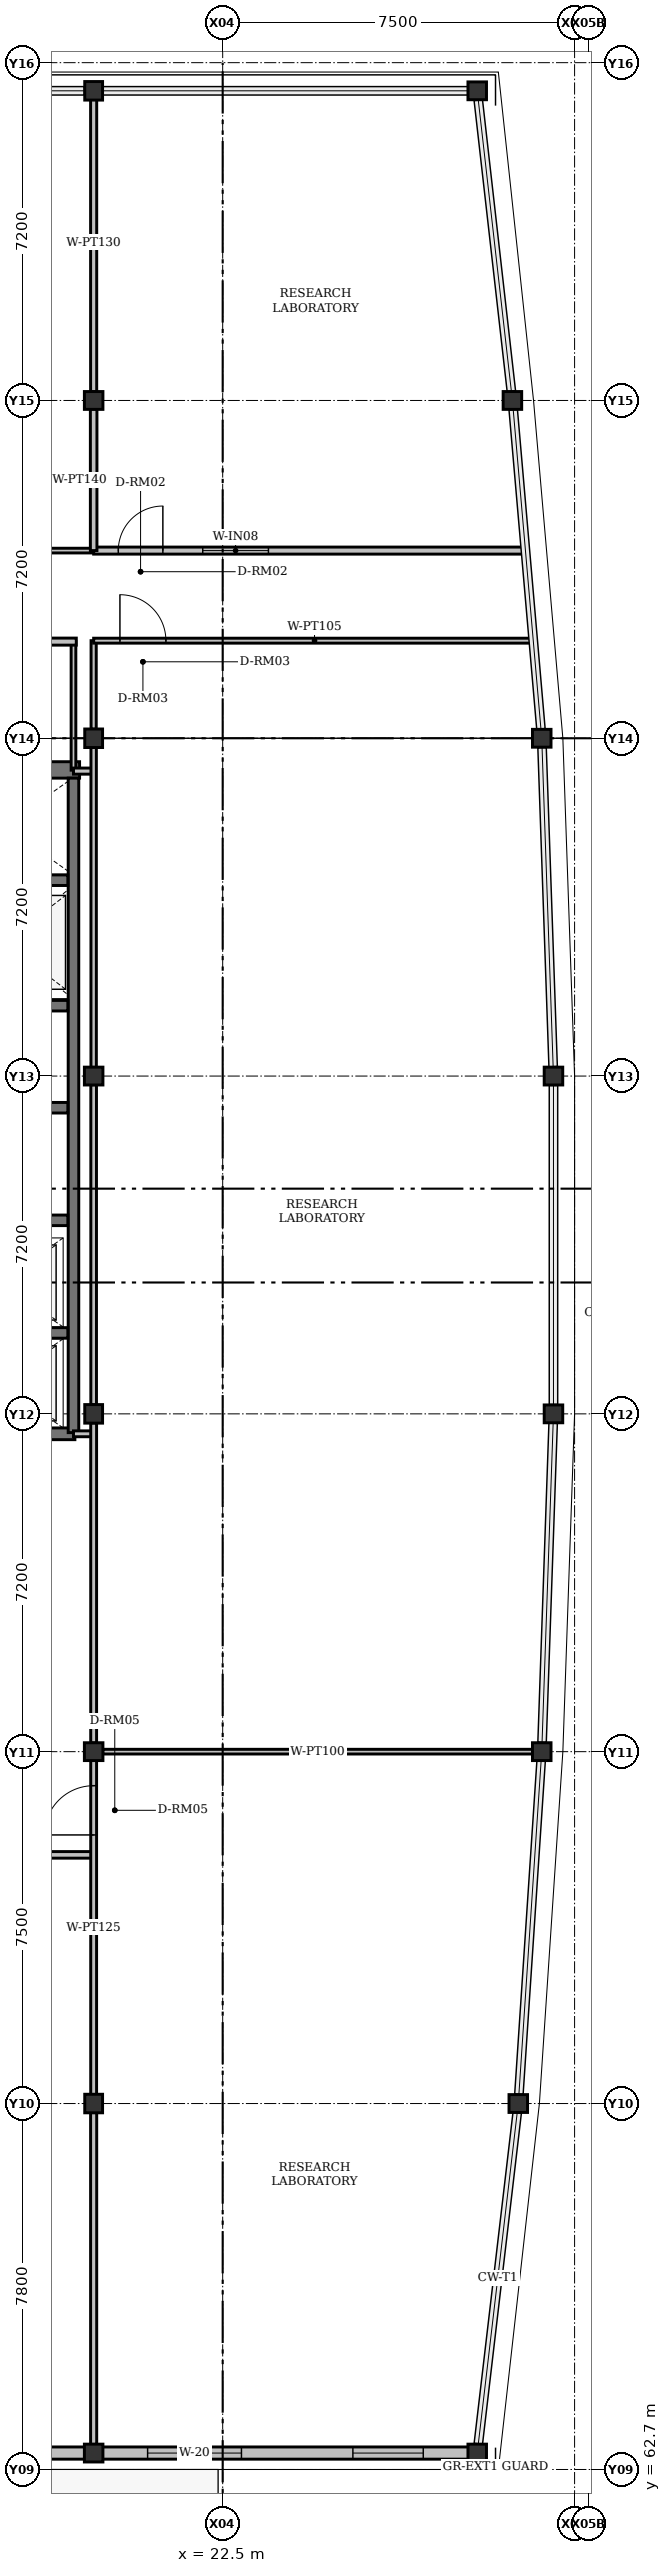
"""IFC4 building model, lengths in metres.
Left out: names, types, materials, properties, quantities, classifications, styles, units other than length and angle.
Written with IfcOpenShell. Run it as: python <this file> out.ifc"""

import sys

from ifc_helpers import new_model, si_unit, direction, frame, frame_2d, origin, origin_2d, place, context, subcontext, project, spatial, rectangle, i_section, extrude, element, fill, save


model = new_model("IFC4")
c1 = context("Model", 3, precision=1e-05, world=origin(), true_north=direction((0.0, 1.0)))
c2 = subcontext(c1, "Body", "Model", "MODEL_VIEW")
j1 = project(units=[si_unit("LENGTHUNIT", "METRE"), si_unit("PLANEANGLEUNIT", "RADIAN")], contexts=[c1])
p1 = place(None, origin())
s1 = spatial("IfcSite", under=j1, at=p1, CompositionType="ELEMENT")
p2 = place(p1, origin())
s2 = spatial("IfcBuilding", under=s1, at=p2, CompositionType="ELEMENT")
p3 = place(p2, frame((0.0, 0.0, 14.1)))
s3 = spatial("IfcBuildingStorey", under=s2, at=p3, CompositionType="ELEMENT", Elevation=14.1)
for number, where, z_axis, x_axis in (
    (1, (19.75, 63.05, 0.0), (0.0, 0.0, 1.0), (1.0, 0.0, 0.0)),
    (2, (27.925, 63.05, 0.0), (0.0, 0.0, 1.0), (1.0, 0.0, 0.0)),
    (3, (19.75, 70.5, 0.0), (0.0, 0.0, 1.0), (0.0, 1.0, 0.0)),
    (4, (28.8, 70.5, 0.0), (0.0, 0.0, 1.0), (1.0, 0.0, 0.0)),
    (5, (19.75, 78.0, 0.0), (0.0, 0.0, 1.0), (1.0, 0.0, 0.0)),
    (6, (29.3, 78.0, 0.0), (0.0, 0.0, 1.0), (1.0, 0.0, 0.0)),
    (7, (19.75, 85.2, 0.0), (0.0, 0.0, 1.0), (0.0, 1.0, 0.0)),
    (8, (29.55, 85.2, 0.0), (0.0, 0.0, 1.0), (1.0, 0.0, 0.0)),
    (9, (19.75, 92.4, 0.0), (0.0, 0.0, 1.0), (1.0, 0.0, 0.0)),
    (10, (29.55, 92.4, 0.0), (0.0, 0.0, 1.0), (1.0, 0.0, 0.0)),
    (11, (19.75, 99.6, 0.0), (0.0, 0.0, 1.0), (0.0, 1.0, 0.0)),
    (12, (29.3, 99.6, 0.0), (0.0, 0.0, 1.0), (1.0, 0.0, 0.0)),
    (13, (19.75, 106.8, 0.0), (0.0, 0.0, 1.0), (1.0, 0.0, 0.0)),
    (14, (28.675, 106.8, 0.0), (0.0, 0.0, 1.0), (1.0, 0.0, 0.0)),
    (15, (19.75, 113.4, 0.0), (0.0, 0.0, 1.0), (0.0, 1.0, 0.0)),
    (16, (27.925, 113.4, 0.0), (0.0, 0.0, 1.0), (1.0, 0.0, 0.0)),
):
    element("IfcColumn", number, at=place(p3, frame(where, z_axis=z_axis, x_axis=x_axis)), inside=s3, PredefinedType="COLUMN", context=c2, shape_type="SweptSolid", body=[
        extrude(i_section(OverallWidth=0.395, OverallDepth=0.38, WebThickness=0.019, FlangeThickness=0.03, FilletRadius=0.015, at=origin_2d()), origin(), (0.0, 0.0, 1.0), 4.2),
    ])
p4 = place(p3, frame((19.75, 63.05, 0.0), z_axis=(0.0, 0.0, 1.0), x_axis=(-1.0, 0.0, 0.0)))
e17 = element("IfcWall", 17, at=p4, inside=s3, PredefinedType="SOLIDWALL", context=c2, shape_type="SweptSolid", body=[
    extrude(rectangle(XDim=11.9, YDim=0.26, at=frame_2d((5.95, 0.0))), origin(), (0.0, 0.0, 1.0), 3.577),
])
p5 = place(p4, frame((1.15, 0.0, 0.92)))
e18 = element("IfcOpeningElement", 18, at=p5, cuts=e17, PredefinedType="OPENING", context=c2, shape_type="SweptSolid", body=[
    extrude(rectangle(XDim=1.8, YDim=1.55, at=frame_2d((0.9, 0.775))), frame((0.0, 0.13, 0.0), z_axis=(0.0, -1.0, 0.0), x_axis=(1.0, 0.0, 0.0)), (0.0, 0.0, 1.0), 0.26),
])
p6 = place(p4, frame((8.35, 0.0, 0.92)))
e19 = element("IfcOpeningElement", 19, at=p6, cuts=e17, PredefinedType="OPENING", context=c2, shape_type="SweptSolid", body=[
    extrude(rectangle(XDim=2.4, YDim=1.7, at=frame_2d((1.2, 0.85))), frame((0.0, 0.13, 0.0), z_axis=(0.0, -1.0, 0.0), x_axis=(1.0, 0.0, 0.0)), (0.0, 0.0, 1.0), 0.26),
])
p7 = place(p3, frame((27.925, 63.05, 0.0), z_axis=(0.0, 0.0, 1.0), x_axis=(-1.0, 0.0, 0.0)))
e20 = element("IfcWall", 20, at=p7, inside=s3, PredefinedType="SOLIDWALL", context=c2, shape_type="SweptSolid", body=[
    extrude(rectangle(XDim=8.175, YDim=0.26, at=frame_2d((4.087, 0.0))), origin(), (0.0, 0.0, 1.0), 3.577),
])
p8 = place(p7, frame((1.15, 0.0, 0.92)))
e21 = element("IfcOpeningElement", 21, at=p8, cuts=e20, PredefinedType="OPENING", context=c2, shape_type="SweptSolid", body=[
    extrude(rectangle(XDim=1.5, YDim=1.7, at=frame_2d((0.75, 0.85))), frame((0.0, 0.13, 0.0), z_axis=(0.0, -1.0, 0.0), x_axis=(1.0, 0.0, 0.0)), (0.0, 0.0, 1.0), 0.26),
])
p9 = place(p7, frame((5.025, 0.0, 0.92)))
e22 = element("IfcOpeningElement", 22, at=p9, cuts=e20, PredefinedType="OPENING", context=c2, shape_type="SweptSolid", body=[
    extrude(rectangle(XDim=2.0, YDim=1.35, at=frame_2d((1.0, 0.675))), frame((0.0, 0.13, 0.0), z_axis=(0.0, -1.0, 0.0), x_axis=(1.0, 0.0, 0.0)), (0.0, 0.0, 1.0), 0.26),
])
p10 = place(p3, frame((16.15, 98.925, 0.0), z_axis=(0.0, 0.0, 1.0), x_axis=(1.0, 0.0, 0.0)))
e23 = element("IfcWall", 23, at=p10, inside=s3, PredefinedType="SHEAR", context=c2, shape_type="SweptSolid", body=[
    extrude(rectangle(XDim=3.3, YDim=0.35, at=frame_2d((1.65, 0.0))), origin(), (0.0, 0.0, 1.0), 4.2),
])
p11 = place(p3, frame((16.4, 84.775, 0.0), z_axis=(0.0, 0.0, 1.0), x_axis=(1.0, 0.0, 0.0)))
e24 = element("IfcWall", 24, at=p11, inside=s3, PredefinedType="SHEAR", context=c2, shape_type="SweptSolid", body=[
    extrude(rectangle(XDim=2.95, YDim=0.25, at=frame_2d((1.475, 0.0))), origin(), (0.0, 0.0, 1.0), 4.2),
])
p12 = place(p3, frame((19.32, 84.8, 0.0), z_axis=(0.0, 0.0, 1.0), x_axis=(0.0, 1.0, 0.0)))
e25 = element("IfcWall", 25, at=p12, inside=s3, PredefinedType="SHEAR", context=c2, shape_type="SweptSolid", body=[
    extrude(rectangle(XDim=13.95, YDim=0.225, at=frame_2d((6.975, 0.0))), origin(), (0.0, 0.0, 1.0), 4.2),
])
for number, where, z_axis, x_axis in (
    (26, (16.4, 86.925, 0.0), (0.0, 0.0, 1.0), (1.0, 0.0, 0.0)),
    (27, (16.4, 89.325, 0.0), (0.0, 0.0, 1.0), (1.0, 0.0, 0.0)),
    (28, (16.4, 91.725, 0.0), (0.0, 0.0, 1.0), (1.0, 0.0, 0.0)),
    (29, (16.4, 93.9, 0.0), (0.0, 0.0, 1.0), (1.0, 0.0, 0.0)),
    (30, (16.4, 96.575, 0.0), (0.0, 0.0, 1.0), (1.0, 0.0, 0.0)),
):
    element("IfcWall", number, at=place(p3, frame(where, z_axis=z_axis, x_axis=x_axis)), inside=s3, PredefinedType="SHEAR", context=c2, shape_type="SweptSolid", body=[
        extrude(rectangle(XDim=2.8, YDim=0.225, at=frame_2d((1.4, 0.0))), origin(), (0.0, 0.0, 1.0), 4.2),
    ])
p13 = place(p3, frame((19.32, 98.92, 0.0), z_axis=(0.0, 0.0, 1.0), x_axis=(0.0, 1.0, 0.0)))
e31 = element("IfcWall", 31, at=p13, inside=s3, PredefinedType="PARTITIONING", context=c2, shape_type="SweptSolid", body=[
    extrude(rectangle(XDim=2.74, YDim=0.1, at=frame_2d((1.37, 0.0))), origin(), (0.0, 0.0, 1.0), 3.451),
])
p14 = place(p3, frame((19.38, 101.66, 0.0), z_axis=(0.0, 0.0, 1.0), x_axis=(-1.0, 0.0, 0.0)))
e32 = element("IfcWall", 32, at=p14, inside=s3, PredefinedType="PARTITIONING", context=c2, shape_type="SweptSolid", body=[
    extrude(rectangle(XDim=3.16, YDim=0.15, at=frame_2d((1.58, 0.0))), origin(), (0.0, 0.0, 1.0), 3.95),
])
p15 = place(p3, frame((19.75, 98.9, 0.0), z_axis=(0.0, 0.0, 1.0), x_axis=(-1.0, 0.0, 0.0)))
e33 = element("IfcWall", 33, at=p15, inside=s3, PredefinedType="PARTITIONING", context=c2, shape_type="SweptSolid", body=[
    extrude(rectangle(XDim=0.43, YDim=0.13, at=frame_2d((0.215, 0.0))), origin(), (0.0, 0.0, 1.0), 3.527),
])
p16 = place(p3, frame((19.32, 84.775, 0.0), z_axis=(0.0, 0.0, 1.0), x_axis=(1.0, 0.0, 0.0)))
e34 = element("IfcWall", 34, at=p16, inside=s3, PredefinedType="PARTITIONING", context=c2, shape_type="SweptSolid", body=[
    extrude(rectangle(XDim=0.43, YDim=0.125, at=frame_2d((0.215, 0.0))), origin(), (0.0, 0.0, 1.0), 3.527),
])
p17 = place(p3, frame((0.65, 103.6, 0.0), z_axis=(0.0, 0.0, 1.0), x_axis=(1.0, 0.0, 0.0)))
e35 = element("IfcWall", 35, at=p17, inside=s3, PredefinedType="PARTITIONING", context=c2, shape_type="SweptSolid", body=[
    extrude(rectangle(XDim=19.1, YDim=0.1, at=frame_2d((9.55, 0.0))), origin(), (0.0, 0.0, 1.0), 3.527),
])
p18 = place(p17, frame((9.49, 0.0, 0.0)))
e36 = element("IfcOpeningElement", 36, at=p18, cuts=e35, PredefinedType="OPENING", context=c2, shape_type="SweptSolid", body=[
    extrude(rectangle(XDim=0.92, YDim=2.1, at=frame_2d((0.46, 1.05))), frame((0.0, 0.05, 0.0), z_axis=(0.0, -1.0, 0.0), x_axis=(1.0, 0.0, 0.0)), (0.0, 0.0, 1.0), 0.1),
])
p19 = place(p17, frame((11.26, 0.0, 0.92)))
e37 = element("IfcOpeningElement", 37, at=p19, cuts=e35, PredefinedType="OPENING", context=c2, shape_type="SweptSolid", body=[
    extrude(rectangle(XDim=1.2, YDim=1.2, at=frame_2d((0.6, 0.6))), frame((0.0, 0.05, 0.0), z_axis=(0.0, -1.0, 0.0), x_axis=(1.0, 0.0, 0.0)), (0.0, 0.0, 1.0), 0.1),
])
p20 = place(p3, frame((19.75, 103.6, 0.0), z_axis=(0.0, 0.0, 1.0), x_axis=(1.0, 0.0, 0.0)))
e38 = element("IfcWall", 38, at=p20, inside=s3, PredefinedType="PARTITIONING", context=c2, shape_type="SweptSolid", body=[
    extrude(rectangle(XDim=9.165, YDim=0.15, at=frame_2d((4.583, 0.0))), origin(), (0.0, 0.0, 1.0), 3.527),
])
p21 = place(p20, frame((0.525, 0.0, 0.0)))
e39 = element("IfcOpeningElement", 39, at=p21, cuts=e38, PredefinedType="OPENING", context=c2, shape_type="SweptSolid", body=[
    extrude(rectangle(XDim=0.95, YDim=2.1, at=frame_2d((0.475, 1.05))), frame((0.0, 0.075, 0.0), z_axis=(0.0, -1.0, 0.0), x_axis=(1.0, 0.0, 0.0)), (0.0, 0.0, 1.0), 0.15),
])
p22 = place(p20, frame((2.325, 0.0, 0.92)))
e40 = element("IfcOpeningElement", 40, at=p22, cuts=e38, PredefinedType="OPENING", context=c2, shape_type="SweptSolid", body=[
    extrude(rectangle(XDim=1.4, YDim=1.2, at=frame_2d((0.7, 0.6))), frame((0.0, 0.075, 0.0), z_axis=(0.0, -1.0, 0.0), x_axis=(1.0, 0.0, 0.0)), (0.0, 0.0, 1.0), 0.15),
])
p23 = place(p3, frame((19.75, 106.615, 0.0), z_axis=(0.0, 0.0, 1.0), x_axis=(0.0, -1.0, 0.0)))
e41 = element("IfcWall", 41, at=p23, inside=s3, PredefinedType="PARTITIONING", context=c2, shape_type="SweptSolid", body=[
    extrude(rectangle(XDim=3.015, YDim=0.14, at=frame_2d((1.507, 0.0))), origin(), (0.0, 0.0, 1.0), 3.527),
])
p24 = place(p3, frame((19.75, 113.35, 0.0), z_axis=(0.0, 0.0, 1.0), x_axis=(0.0, -1.0, 0.0)))
e42 = element("IfcWall", 42, at=p24, inside=s3, PredefinedType="PARTITIONING", context=c2, shape_type="SweptSolid", body=[
    extrude(rectangle(XDim=6.365, YDim=0.13, at=frame_2d((3.183, 0.0))), origin(), (0.0, 0.0, 1.0), 3.527),
])
p25 = place(p3, frame((19.75, 78.185, 0.0), z_axis=(0.0, 0.0, 1.0), x_axis=(0.0, 1.0, 0.0)))
e43 = element("IfcWall", 43, at=p25, inside=s3, PredefinedType="PARTITIONING", context=c2, shape_type="SweptSolid", body=[
    extrude(rectangle(XDim=6.823, YDim=0.125, at=frame_2d((3.411, 0.0))), origin(), (0.0, 0.0, 1.0), 3.527),
])
p26 = place(p3, frame((19.75, 85.393, 0.0), z_axis=(0.0, 0.0, 1.0), x_axis=(0.0, 1.0, 0.0)))
e44 = element("IfcWall", 44, at=p26, inside=s3, PredefinedType="PARTITIONING", context=c2, shape_type="SweptSolid", body=[
    extrude(rectangle(XDim=6.823, YDim=0.12, at=frame_2d((3.411, 0.0))), origin(), (0.0, 0.0, 1.0), 3.527),
])
p27 = place(p3, frame((19.75, 92.585, 0.0), z_axis=(0.0, 0.0, 1.0), x_axis=(0.0, 1.0, 0.0)))
e45 = element("IfcWall", 45, at=p27, inside=s3, PredefinedType="PARTITIONING", context=c2, shape_type="SweptSolid", body=[
    extrude(rectangle(XDim=6.823, YDim=0.115, at=frame_2d((3.411, 0.0))), origin(), (0.0, 0.0, 1.0), 3.527),
])
p28 = place(p3, frame((19.75, 99.792, 0.0), z_axis=(0.0, 0.0, 1.0), x_axis=(0.0, 1.0, 0.0)))
e46 = element("IfcWall", 46, at=p28, inside=s3, PredefinedType="PARTITIONING", context=c2, shape_type="SweptSolid", body=[
    extrude(rectangle(XDim=1.887, YDim=0.11, at=frame_2d((0.944, 0.0))), origin(), (0.0, 0.0, 1.0), 3.527),
])
p29 = place(p3, frame((19.75, 101.68, 0.0), z_axis=(0.0, 0.0, 1.0), x_axis=(1.0, 0.0, 0.0)))
e47 = element("IfcWall", 47, at=p29, inside=s3, PredefinedType="PARTITIONING", context=c2, shape_type="SweptSolid", body=[
    extrude(rectangle(XDim=9.415, YDim=0.105, at=frame_2d((4.708, 0.0))), origin(), (0.0, 0.0, 1.0), 3.527),
])
p30 = place(p29, frame((0.56, 0.0, 0.0)))
e48 = element("IfcOpeningElement", 48, at=p30, cuts=e47, PredefinedType="OPENING", context=c2, shape_type="SweptSolid", body=[
    extrude(rectangle(XDim=0.98, YDim=2.1, at=frame_2d((0.49, 1.05))), frame((0.0, 0.052, 0.0), z_axis=(0.0, -1.0, 0.0), x_axis=(1.0, 0.0, 0.0)), (0.0, 0.0, 1.0), 0.105),
])
p31 = place(p3, frame((29.107, 78.0, 0.0), z_axis=(0.0, 0.0, 1.0), x_axis=(-1.0, 0.0, 0.0)))
e49 = element("IfcWall", 49, at=p31, inside=s3, PredefinedType="PARTITIONING", context=c2, shape_type="SweptSolid", body=[
    extrude(rectangle(XDim=9.165, YDim=0.1, at=frame_2d((4.583, 0.0))), origin(), (0.0, 0.0, 1.0), 3.451),
])
p32 = place(p3, frame((19.75, 75.8, 0.0), z_axis=(0.0, 0.0, 1.0), x_axis=(-1.0, 0.0, 0.0)))
e50 = element("IfcWall", 50, at=p32, inside=s3, PredefinedType="PARTITIONING", context=c2, shape_type="SweptSolid", body=[
    extrude(rectangle(XDim=14.2, YDim=0.14, at=frame_2d((7.1, 0.0))), origin(), (0.0, 0.0, 1.0), 3.527),
])
p33 = place(p32, frame((8.05, 0.0, 0.0)))
e51 = element("IfcOpeningElement", 51, at=p33, cuts=e50, PredefinedType="OPENING", context=c2, shape_type="SweptSolid", body=[
    extrude(rectangle(XDim=1.0, YDim=2.1, at=frame_2d((0.5, 1.05))), frame((0.0, 0.07, 0.0), z_axis=(0.0, -1.0, 0.0), x_axis=(1.0, 0.0, 0.0)), (0.0, 0.0, 1.0), 0.14),
])
p34 = place(p32, frame((9.9, 0.0, 0.92)))
e52 = element("IfcOpeningElement", 52, at=p34, cuts=e50, PredefinedType="OPENING", context=c2, shape_type="SweptSolid", body=[
    extrude(rectangle(XDim=1.0, YDim=1.3, at=frame_2d((0.5, 0.65))), frame((0.0, 0.07, 0.0), z_axis=(0.0, -1.0, 0.0), x_axis=(1.0, 0.0, 0.0)), (0.0, 0.0, 1.0), 0.14),
])
p35 = place(p3, frame((19.75, 63.235, 0.0), z_axis=(0.0, 0.0, 1.0), x_axis=(0.0, 1.0, 0.0)))
e53 = element("IfcWall", 53, at=p35, inside=s3, PredefinedType="PARTITIONING", context=c2, shape_type="SweptSolid", body=[
    extrude(rectangle(XDim=7.073, YDim=0.13, at=frame_2d((3.536, 0.0))), origin(), (0.0, 0.0, 1.0), 3.527),
])
p36 = place(p3, frame((19.75, 70.692, 0.0), z_axis=(0.0, 0.0, 1.0), x_axis=(0.0, 1.0, 0.0)))
e54 = element("IfcWall", 54, at=p36, inside=s3, PredefinedType="PARTITIONING", context=c2, shape_type="SweptSolid", body=[
    extrude(rectangle(XDim=7.123, YDim=0.125, at=frame_2d((3.561, 0.0))), origin(), (0.0, 0.0, 1.0), 3.527),
])
p37 = place(p36, frame((5.532, 0.0, 0.0)))
e55 = element("IfcOpeningElement", 55, at=p37, cuts=e54, PredefinedType="OPENING", context=c2, shape_type="SweptSolid", body=[
    extrude(rectangle(XDim=1.05, YDim=2.1, at=frame_2d((0.525, 1.05))), frame((0.0, 0.062, 0.0), z_axis=(0.0, -1.0, 0.0), x_axis=(1.0, 0.0, 0.0)), (0.0, 0.0, 1.0), 0.125),
])
p38 = place(p8, origin())
e56 = element("IfcWindow", 56, at=p38, inside=s3, PartitioningType="SINGLE_PANEL", PredefinedType="WINDOW", context=c2, shape_type="SweptSolid", body=[
    extrude(rectangle(XDim=1.5, YDim=1.7, at=frame_2d((0.75, 0.85))), frame((0.0, 0.03, 0.0), z_axis=(0.0, -1.0, 0.0), x_axis=(1.0, 0.0, 0.0)), (0.0, 0.0, 1.0), 0.06),
])
fill(e21, e56)
p39 = place(p9, origin())
e57 = element("IfcWindow", 57, at=p39, inside=s3, PartitioningType="DOUBLE_PANEL_VERTICAL", PredefinedType="WINDOW", context=c2, shape_type="SweptSolid", body=[
    extrude(rectangle(XDim=2.0, YDim=1.35, at=frame_2d((1.0, 0.675))), frame((0.0, 0.03, 0.0), z_axis=(0.0, -1.0, 0.0), x_axis=(1.0, 0.0, 0.0)), (0.0, 0.0, 1.0), 0.06),
])
fill(e22, e57)
p40 = place(p21, origin())
e58 = element("IfcDoor", 58, at=p40, inside=s3, OperationType="SINGLE_SWING_RIGHT", PredefinedType="DOOR", context=c2, shape_type="SweptSolid", body=[
    extrude(rectangle(XDim=0.95, YDim=2.1, at=frame_2d((0.475, 1.05))), frame((0.0, 0.025, 0.0), z_axis=(0.0, -1.0, 0.0), x_axis=(1.0, 0.0, 0.0)), (0.0, 0.0, 1.0), 0.05),
])
fill(e39, e58)
p41 = place(p22, origin())
e59 = element("IfcWindow", 59, at=p41, inside=s3, PartitioningType="SINGLE_PANEL", PredefinedType="WINDOW", context=c2, shape_type="SweptSolid", body=[
    extrude(rectangle(XDim=1.4, YDim=1.2, at=frame_2d((0.7, 0.6))), frame((0.0, 0.03, 0.0), z_axis=(0.0, -1.0, 0.0), x_axis=(1.0, 0.0, 0.0)), (0.0, 0.0, 1.0), 0.06),
])
fill(e40, e59)
p42 = place(p30, origin())
e60 = element("IfcDoor", 60, at=p42, inside=s3, OperationType="SINGLE_SWING_LEFT", PredefinedType="DOOR", context=c2, shape_type="SweptSolid", body=[
    extrude(rectangle(XDim=0.98, YDim=2.1, at=frame_2d((0.49, 1.05))), frame((0.0, 0.025, 0.0), z_axis=(0.0, -1.0, 0.0), x_axis=(1.0, 0.0, 0.0)), (0.0, 0.0, 1.0), 0.05),
])
fill(e48, e60)
p43 = place(p37, origin())
e61 = element("IfcDoor", 61, at=p43, inside=s3, OperationType="SINGLE_SWING_LEFT", PredefinedType="DOOR", context=c2, shape_type="SweptSolid", body=[
    extrude(rectangle(XDim=1.05, YDim=2.1, at=frame_2d((0.525, 1.05))), frame((0.0, 0.025, 0.0), z_axis=(0.0, -1.0, 0.0), x_axis=(1.0, 0.0, 0.0)), (0.0, 0.0, 1.0), 0.05),
])
fill(e55, e61)
save(model, sys.argv[1])
